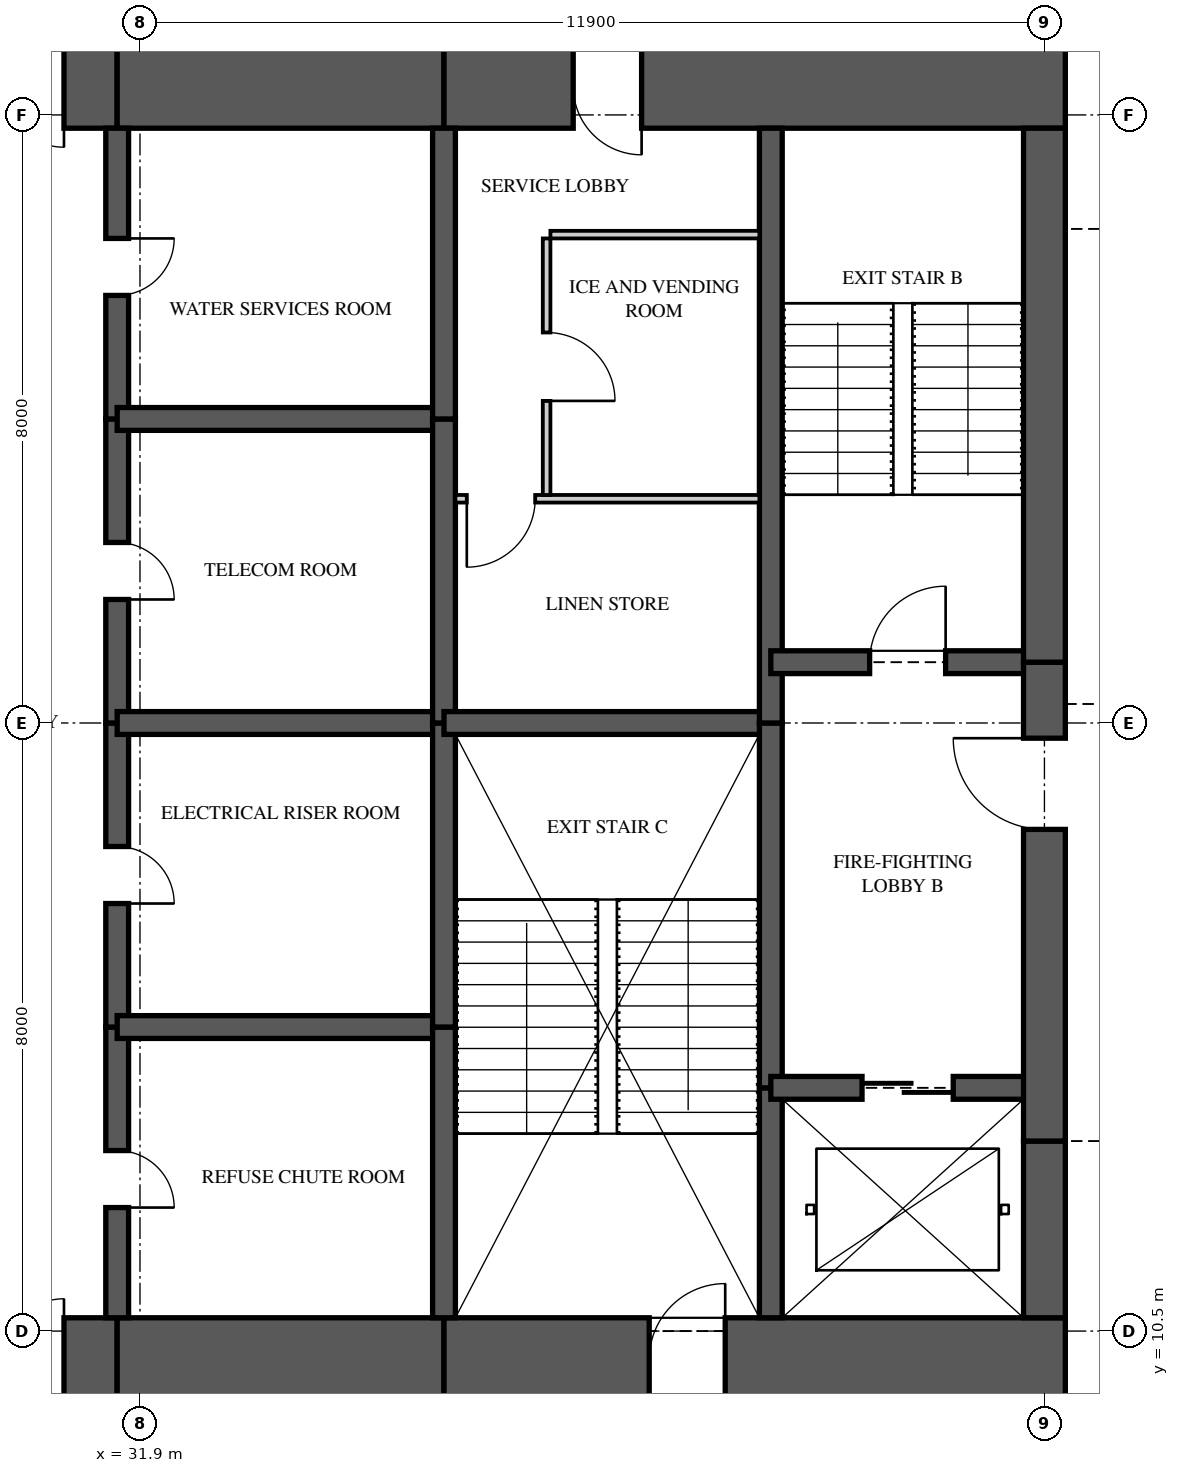
"""IFC4 building model, lengths in metres.
Left out: names, types, materials, properties, quantities, classifications, styles, units other than length and angle.
Written with IfcOpenShell. Run it as: python <this file> out.ifc"""

import sys

from ifc_helpers import new_model, si_unit, direction, frame, frame_2d, origin, place, context, subcontext, project, spatial, rectangle, extrude, element, fill, save


model = new_model("IFC4")
c1 = context("Model", 3, precision=1e-05, world=origin(), true_north=direction((0.0, 1.0)))
c2 = subcontext(c1, "Body", "Model", "MODEL_VIEW")
j1 = project(units=[si_unit("LENGTHUNIT", "METRE"), si_unit("PLANEANGLEUNIT", "RADIAN")], contexts=[c1])
p1 = place(None, origin())
s1 = spatial("IfcSite", under=j1, at=p1, CompositionType="ELEMENT")
p2 = place(p1, origin())
s2 = spatial("IfcBuilding", under=s1, at=p2, CompositionType="ELEMENT")
p3 = place(p2, frame((0.0, 0.0, 242.45)))
s3 = spatial("IfcBuildingStorey", under=s2, at=p3, CompositionType="ELEMENT", Elevation=242.45)
p4 = place(p3, frame((26.0, 10.125, 0.0), z_axis=(0.0, 0.0, 1.0), x_axis=(1.0, 0.0, 0.0)))
e1 = element("IfcWall", 1, at=p4, inside=s3, PredefinedType="SHEAR", context=c2, shape_type="SweptSolid", body=[
    extrude(rectangle(XDim=5.6, YDim=1.1, at=frame_2d((2.8, 0.0))), origin(), (0.0, 0.0, 1.0), 3.5),
])
p5 = place(p4, frame((3.3, 0.0, 0.0)))
e2 = element("IfcOpeningElement", 2, at=p5, cuts=e1, PredefinedType="OPENING", context=c2, shape_type="SweptSolid", body=[
    extrude(rectangle(XDim=1.6, YDim=2.1, at=frame_2d((0.8, 1.05))), frame((0.0, 0.56, 0.0), z_axis=(0.0, -1.0, 0.0), x_axis=(1.0, 0.0, 0.0)), (0.0, 0.0, 1.0), 1.12),
])
p6 = place(p3, frame((31.6, 10.125, 0.0), z_axis=(0.0, 0.0, 1.0), x_axis=(1.0, 0.0, 0.0)))
e3 = element("IfcWall", 3, at=p6, inside=s3, PredefinedType="SHEAR", context=c2, shape_type="SweptSolid", body=[
    extrude(rectangle(XDim=4.3, YDim=1.1, at=frame_2d((2.15, 0.0))), origin(), (0.0, 0.0, 1.0), 3.5),
])
p7 = place(p3, frame((35.9, 10.125, 0.0), z_axis=(0.0, 0.0, 1.0), x_axis=(1.0, 0.0, 0.0)))
e4 = element("IfcWall", 4, at=p7, inside=s3, PredefinedType="SHEAR", context=c2, shape_type="SweptSolid", body=[
    extrude(rectangle(XDim=8.175, YDim=1.1, at=frame_2d((4.087, 0.0))), origin(), (0.0, 0.0, 1.0), 3.5),
])
p8 = place(p7, frame((2.7, 0.0, 0.0)))
e5 = element("IfcOpeningElement", 5, at=p8, cuts=e4, PredefinedType="OPENING", context=c2, shape_type="SweptSolid", body=[
    extrude(rectangle(XDim=1.0, YDim=2.1, at=frame_2d((0.5, 1.05))), frame((0.0, 0.56, 0.0), z_axis=(0.0, -1.0, 0.0), x_axis=(1.0, 0.0, 0.0)), (0.0, 0.0, 1.0), 1.12),
])
p9 = place(p3, frame((44.075, 26.875, 0.0), z_axis=(0.0, 0.0, 1.0), x_axis=(-1.0, 0.0, 0.0)))
e6 = element("IfcWall", 6, at=p9, inside=s3, PredefinedType="SHEAR", context=c2, shape_type="SweptSolid", body=[
    extrude(rectangle(XDim=8.175, YDim=1.1, at=frame_2d((4.087, 0.0))), origin(), (0.0, 0.0, 1.0), 3.5),
])
p10 = place(p9, frame((5.575, 0.0, 0.0)))
e7 = element("IfcOpeningElement", 7, at=p10, cuts=e6, PredefinedType="OPENING", context=c2, shape_type="SweptSolid", body=[
    extrude(rectangle(XDim=0.9, YDim=2.1, at=frame_2d((0.45, 1.05))), frame((0.0, 0.56, 0.0), z_axis=(0.0, -1.0, 0.0), x_axis=(1.0, 0.0, 0.0)), (0.0, 0.0, 1.0), 1.12),
])
p11 = place(p3, frame((35.9, 26.875, 0.0), z_axis=(0.0, 0.0, 1.0), x_axis=(-1.0, 0.0, 0.0)))
e8 = element("IfcWall", 8, at=p11, inside=s3, PredefinedType="SHEAR", context=c2, shape_type="SweptSolid", body=[
    extrude(rectangle(XDim=4.3, YDim=1.1, at=frame_2d((2.15, 0.0))), origin(), (0.0, 0.0, 1.0), 3.5),
])
p12 = place(p3, frame((31.6, 26.875, 0.0), z_axis=(0.0, 0.0, 1.0), x_axis=(-1.0, 0.0, 0.0)))
e9 = element("IfcWall", 9, at=p12, inside=s3, PredefinedType="SHEAR", context=c2, shape_type="SweptSolid", body=[
    extrude(rectangle(XDim=5.6, YDim=1.1, at=frame_2d((2.8, 0.0))), origin(), (0.0, 0.0, 1.0), 3.5),
])
p13 = place(p12, frame((0.7, 0.0, 0.0)))
e10 = element("IfcOpeningElement", 10, at=p13, cuts=e9, PredefinedType="OPENING", context=c2, shape_type="SweptSolid", body=[
    extrude(rectangle(XDim=1.6, YDim=2.1, at=frame_2d((0.8, 1.05))), frame((0.0, 0.56, 0.0), z_axis=(0.0, -1.0, 0.0), x_axis=(1.0, 0.0, 0.0)), (0.0, 0.0, 1.0), 1.12),
])
p14 = place(p3, frame((43.8, 10.675, 0.0), z_axis=(0.0, 0.0, 1.0), x_axis=(0.0, 1.0, 0.0)))
e11 = element("IfcWall", 11, at=p14, inside=s3, PredefinedType="SHEAR", context=c2, shape_type="SweptSolid", body=[
    extrude(rectangle(XDim=2.325, YDim=0.55, at=frame_2d((1.163, 0.0))), origin(), (0.0, 0.0, 1.0), 3.5),
])
p15 = place(p3, frame((43.8, 13.0, 0.0), z_axis=(0.0, 0.0, 1.0), x_axis=(0.0, 1.0, 0.0)))
e12 = element("IfcWall", 12, at=p15, inside=s3, PredefinedType="SHEAR", context=c2, shape_type="SweptSolid", body=[
    extrude(rectangle(XDim=6.3, YDim=0.55, at=frame_2d((3.15, 0.0))), origin(), (0.0, 0.0, 1.0), 3.5),
])
p16 = place(p15, frame((4.1, 0.0, 0.0)))
e13 = element("IfcOpeningElement", 13, at=p16, cuts=e12, PredefinedType="OPENING", context=c2, shape_type="SweptSolid", body=[
    extrude(rectangle(XDim=1.2, YDim=2.2, at=frame_2d((0.6, 1.1))), frame((0.0, 0.285, 0.0), z_axis=(0.0, -1.0, 0.0), x_axis=(1.0, 0.0, 0.0)), (0.0, 0.0, 1.0), 0.57),
])
p17 = place(p3, frame((43.8, 19.3, 0.0), z_axis=(0.0, 0.0, 1.0), x_axis=(0.0, 1.0, 0.0)))
e14 = element("IfcWall", 14, at=p17, inside=s3, PredefinedType="SHEAR", context=c2, shape_type="SweptSolid", body=[
    extrude(rectangle(XDim=7.025, YDim=0.55, at=frame_2d((3.512, 0.0))), origin(), (0.0, 0.0, 1.0), 3.5),
])
p18 = place(p3, frame((31.6, 10.675, 0.0), z_axis=(0.0, 0.0, 1.0), x_axis=(0.0, 1.0, 0.0)))
e15 = element("IfcWall", 15, at=p18, inside=s3, PredefinedType="SHEAR", context=c2, shape_type="SweptSolid", body=[
    extrude(rectangle(XDim=3.825, YDim=0.3, at=frame_2d((1.913, 0.0))), origin(), (0.0, 0.0, 1.0), 3.5),
])
p19 = place(p18, frame((1.45, 0.0, 0.0)))
e16 = element("IfcOpeningElement", 16, at=p19, cuts=e15, PredefinedType="OPENING", context=c2, shape_type="SweptSolid", body=[
    extrude(rectangle(XDim=0.75, YDim=2.1, at=frame_2d((0.375, 1.05))), frame((0.0, 0.16, 0.0), z_axis=(0.0, -1.0, 0.0), x_axis=(1.0, 0.0, 0.0)), (0.0, 0.0, 1.0), 0.32),
])
p20 = place(p3, frame((31.6, 14.5, 0.0), z_axis=(0.0, 0.0, 1.0), x_axis=(0.0, 1.0, 0.0)))
e17 = element("IfcWall", 17, at=p20, inside=s3, PredefinedType="SHEAR", context=c2, shape_type="SweptSolid", body=[
    extrude(rectangle(XDim=4.0, YDim=0.3, at=frame_2d((2.0, 0.0))), origin(), (0.0, 0.0, 1.0), 3.5),
])
p21 = place(p20, frame((1.625, 0.0, 0.0)))
e18 = element("IfcOpeningElement", 18, at=p21, cuts=e17, PredefinedType="OPENING", context=c2, shape_type="SweptSolid", body=[
    extrude(rectangle(XDim=0.75, YDim=2.1, at=frame_2d((0.375, 1.05))), frame((0.0, 0.16, 0.0), z_axis=(0.0, -1.0, 0.0), x_axis=(1.0, 0.0, 0.0)), (0.0, 0.0, 1.0), 0.32),
])
p22 = place(p3, frame((31.6, 18.5, 0.0), z_axis=(0.0, 0.0, 1.0), x_axis=(0.0, 1.0, 0.0)))
e19 = element("IfcWall", 19, at=p22, inside=s3, PredefinedType="SHEAR", context=c2, shape_type="SweptSolid", body=[
    extrude(rectangle(XDim=4.0, YDim=0.3, at=frame_2d((2.0, 0.0))), origin(), (0.0, 0.0, 1.0), 3.5),
])
p23 = place(p22, frame((1.625, 0.0, 0.0)))
e20 = element("IfcOpeningElement", 20, at=p23, cuts=e19, PredefinedType="OPENING", context=c2, shape_type="SweptSolid", body=[
    extrude(rectangle(XDim=0.75, YDim=2.1, at=frame_2d((0.375, 1.05))), frame((0.0, 0.16, 0.0), z_axis=(0.0, -1.0, 0.0), x_axis=(1.0, 0.0, 0.0)), (0.0, 0.0, 1.0), 0.32),
])
p24 = place(p3, frame((31.6, 22.5, 0.0), z_axis=(0.0, 0.0, 1.0), x_axis=(0.0, 1.0, 0.0)))
e21 = element("IfcWall", 21, at=p24, inside=s3, PredefinedType="SHEAR", context=c2, shape_type="SweptSolid", body=[
    extrude(rectangle(XDim=3.825, YDim=0.3, at=frame_2d((1.913, 0.0))), origin(), (0.0, 0.0, 1.0), 3.5),
])
p25 = place(p24, frame((1.625, 0.0, 0.0)))
e22 = element("IfcOpeningElement", 22, at=p25, cuts=e21, PredefinedType="OPENING", context=c2, shape_type="SweptSolid", body=[
    extrude(rectangle(XDim=0.75, YDim=2.1, at=frame_2d((0.375, 1.05))), frame((0.0, 0.16, 0.0), z_axis=(0.0, -1.0, 0.0), x_axis=(1.0, 0.0, 0.0)), (0.0, 0.0, 1.0), 0.32),
])
p26 = place(p3, frame((35.9, 10.675, 0.0), z_axis=(0.0, 0.0, 1.0), x_axis=(0.0, 1.0, 0.0)))
e23 = element("IfcWall", 23, at=p26, inside=s3, PredefinedType="SHEAR", context=c2, shape_type="SweptSolid", body=[
    extrude(rectangle(XDim=3.825, YDim=0.3, at=frame_2d((1.913, 0.0))), origin(), (0.0, 0.0, 1.0), 3.5),
])
for number, where, z_axis, x_axis in (
    (24, (35.9, 14.5, 0.0), (0.0, 0.0, 1.0), (0.0, 1.0, 0.0)),
    (25, (35.9, 18.5, 0.0), (0.0, 0.0, 1.0), (0.0, 1.0, 0.0)),
):
    element("IfcWall", number, at=place(p3, frame(where, z_axis=z_axis, x_axis=x_axis)), inside=s3, PredefinedType="SHEAR", context=c2, shape_type="SweptSolid", body=[
        extrude(rectangle(XDim=4.0, YDim=0.3, at=frame_2d((2.0, 0.0))), origin(), (0.0, 0.0, 1.0), 3.5),
    ])
p27 = place(p3, frame((35.9, 22.5, 0.0), z_axis=(0.0, 0.0, 1.0), x_axis=(0.0, 1.0, 0.0)))
e26 = element("IfcWall", 26, at=p27, inside=s3, PredefinedType="SHEAR", context=c2, shape_type="SweptSolid", body=[
    extrude(rectangle(XDim=3.825, YDim=0.3, at=frame_2d((1.913, 0.0))), origin(), (0.0, 0.0, 1.0), 3.5),
])
p28 = place(p3, frame((40.2, 10.675, 0.0), z_axis=(0.0, 0.0, 1.0), x_axis=(0.0, 1.0, 0.0)))
e27 = element("IfcWall", 27, at=p28, inside=s3, PredefinedType="SHEAR", context=c2, shape_type="SweptSolid", body=[
    extrude(rectangle(XDim=3.025, YDim=0.3, at=frame_2d((1.512, 0.0))), origin(), (0.0, 0.0, 1.0), 3.5),
])
p29 = place(p3, frame((40.2, 13.7, 0.0), z_axis=(0.0, 0.0, 1.0), x_axis=(0.0, 1.0, 0.0)))
e28 = element("IfcWall", 28, at=p29, inside=s3, PredefinedType="SHEAR", context=c2, shape_type="SweptSolid", body=[
    extrude(rectangle(XDim=4.8, YDim=0.3, at=frame_2d((2.4, 0.0))), origin(), (0.0, 0.0, 1.0), 3.5),
])
p30 = place(p3, frame((40.2, 18.5, 0.0), z_axis=(0.0, 0.0, 1.0), x_axis=(0.0, 1.0, 0.0)))
e29 = element("IfcWall", 29, at=p30, inside=s3, PredefinedType="SHEAR", context=c2, shape_type="SweptSolid", body=[
    extrude(rectangle(XDim=7.825, YDim=0.3, at=frame_2d((3.913, 0.0))), origin(), (0.0, 0.0, 1.0), 3.5),
])
for number, where, z_axis, x_axis in (
    (30, (31.6, 14.5, 0.0), (0.0, 0.0, 1.0), (1.0, 0.0, 0.0)),
    (31, (31.6, 18.5, 0.0), (0.0, 0.0, 1.0), (1.0, 0.0, 0.0)),
    (32, (31.6, 22.5, 0.0), (0.0, 0.0, 1.0), (1.0, 0.0, 0.0)),
):
    element("IfcWall", number, at=place(p3, frame(where, z_axis=z_axis, x_axis=x_axis)), inside=s3, PredefinedType="SHEAR", context=c2, shape_type="SweptSolid", body=[
        extrude(rectangle(XDim=4.3, YDim=0.3, at=frame_2d((2.15, 0.0))), origin(), (0.0, 0.0, 1.0), 3.5),
    ])
p31 = place(p3, frame((35.9, 18.5, 0.0), z_axis=(0.0, 0.0, 1.0), x_axis=(1.0, 0.0, 0.0)))
e33 = element("IfcWall", 33, at=p31, inside=s3, PredefinedType="SHEAR", context=c2, shape_type="SweptSolid", body=[
    extrude(rectangle(XDim=4.3, YDim=0.3, at=frame_2d((2.15, 0.0))), origin(), (0.0, 0.0, 1.0), 3.5),
])
p32 = place(p3, frame((40.2, 13.7, 0.0), z_axis=(0.0, 0.0, 1.0), x_axis=(1.0, 0.0, 0.0)))
e34 = element("IfcWall", 34, at=p32, inside=s3, PredefinedType="SHEAR", context=c2, shape_type="SweptSolid", body=[
    extrude(rectangle(XDim=3.6, YDim=0.3, at=frame_2d((1.8, 0.0))), origin(), (0.0, 0.0, 1.0), 3.5),
])
p33 = place(p32, frame((1.2, 0.0, 0.0)))
e35 = element("IfcOpeningElement", 35, at=p33, cuts=e34, PredefinedType="OPENING", context=c2, shape_type="SweptSolid", body=[
    extrude(rectangle(XDim=1.2, YDim=2.1, at=frame_2d((0.6, 1.05))), frame((0.0, 0.16, 0.0), z_axis=(0.0, -1.0, 0.0), x_axis=(1.0, 0.0, 0.0)), (0.0, 0.0, 1.0), 0.32),
])
p34 = place(p3, frame((40.2, 19.3, 0.0), z_axis=(0.0, 0.0, 1.0), x_axis=(1.0, 0.0, 0.0)))
e36 = element("IfcWall", 36, at=p34, inside=s3, PredefinedType="SHEAR", context=c2, shape_type="SweptSolid", body=[
    extrude(rectangle(XDim=3.6, YDim=0.3, at=frame_2d((1.8, 0.0))), origin(), (0.0, 0.0, 1.0), 3.5),
])
p35 = place(p34, frame((1.3, 0.0, 0.0)))
e37 = element("IfcOpeningElement", 37, at=p35, cuts=e36, PredefinedType="OPENING", context=c2, shape_type="SweptSolid", body=[
    extrude(rectangle(XDim=1.0, YDim=2.1, at=frame_2d((0.5, 1.05))), frame((0.0, 0.16, 0.0), z_axis=(0.0, -1.0, 0.0), x_axis=(1.0, 0.0, 0.0)), (0.0, 0.0, 1.0), 0.32),
])
p36 = place(p3, frame((37.3, 24.925, 0.0), z_axis=(0.0, 0.0, 1.0), x_axis=(1.0, 0.0, 0.0)))
e38 = element("IfcWall", 38, at=p36, inside=s3, PredefinedType="PARTITIONING", context=c2, shape_type="SweptSolid", body=[
    extrude(rectangle(XDim=2.75, YDim=0.1, at=frame_2d((1.375, 0.0))), origin(), (0.0, 0.0, 1.0), 3.26),
])
p37 = place(p3, frame((37.25, 21.5, 0.0), z_axis=(0.0, 0.0, 1.0), x_axis=(0.0, 1.0, 0.0)))
e39 = element("IfcWall", 39, at=p37, inside=s3, PredefinedType="PARTITIONING", context=c2, shape_type="SweptSolid", body=[
    extrude(rectangle(XDim=3.375, YDim=0.1, at=frame_2d((1.688, 0.0))), origin(), (0.0, 0.0, 1.0), 3.26),
])
p38 = place(p37, frame((1.238, 0.0, 0.0)))
e40 = element("IfcOpeningElement", 40, at=p38, cuts=e39, PredefinedType="OPENING", context=c2, shape_type="SweptSolid", body=[
    extrude(rectangle(XDim=0.9, YDim=2.1, at=frame_2d((0.45, 1.05))), frame((0.0, 0.06, 0.0), z_axis=(0.0, -1.0, 0.0), x_axis=(1.0, 0.0, 0.0)), (0.0, 0.0, 1.0), 0.12),
])
p39 = place(p3, frame((36.05, 21.45, 0.0), z_axis=(0.0, 0.0, 1.0), x_axis=(1.0, 0.0, 0.0)))
e41 = element("IfcWall", 41, at=p39, inside=s3, PredefinedType="PARTITIONING", context=c2, shape_type="SweptSolid", body=[
    extrude(rectangle(XDim=4.0, YDim=0.1, at=frame_2d((2.0, 0.0))), origin(), (0.0, 0.0, 1.0), 3.26),
])
p40 = place(p39, frame((0.15, 0.0, 0.0)))
e42 = element("IfcOpeningElement", 42, at=p40, cuts=e41, PredefinedType="OPENING", context=c2, shape_type="SweptSolid", body=[
    extrude(rectangle(XDim=0.9, YDim=2.1, at=frame_2d((0.45, 1.05))), frame((0.0, 0.06, 0.0), z_axis=(0.0, -1.0, 0.0), x_axis=(1.0, 0.0, 0.0)), (0.0, 0.0, 1.0), 0.12),
])
p41 = place(p38, frame((0.9, 0.0, 0.0), z_axis=(0.0, 0.0, 1.0), x_axis=(-1.0, 0.0, 0.0)))
e43 = element("IfcDoor", 43, at=p41, inside=s3, OperationType="SINGLE_SWING_RIGHT", PredefinedType="DOOR", context=c2, shape_type="SweptSolid", body=[
    extrude(rectangle(XDim=0.9, YDim=2.1, at=frame_2d((0.45, 1.05))), frame((0.0, 0.025, 0.0), z_axis=(0.0, -1.0, 0.0), x_axis=(1.0, 0.0, 0.0)), (0.0, 0.0, 1.0), 0.05),
])
fill(e40, e43)
p42 = place(p40, frame((0.9, 0.0, 0.0), z_axis=(0.0, 0.0, 1.0), x_axis=(-1.0, 0.0, 0.0)))
e44 = element("IfcDoor", 44, at=p42, inside=s3, OperationType="SINGLE_SWING_RIGHT", PredefinedType="DOOR", context=c2, shape_type="SweptSolid", body=[
    extrude(rectangle(XDim=0.9, YDim=2.1, at=frame_2d((0.45, 1.05))), frame((0.0, 0.025, 0.0), z_axis=(0.0, -1.0, 0.0), x_axis=(1.0, 0.0, 0.0)), (0.0, 0.0, 1.0), 0.05),
])
fill(e42, e44)
p43 = place(p35, origin())
e45 = element("IfcDoor", 45, at=p43, inside=s3, OperationType="SINGLE_SWING_RIGHT", PredefinedType="DOOR", context=c2, shape_type="SweptSolid", body=[
    extrude(rectangle(XDim=1.0, YDim=2.1, at=frame_2d((0.5, 1.05))), frame((0.0, 0.025, 0.0), z_axis=(0.0, -1.0, 0.0), x_axis=(1.0, 0.0, 0.0)), (0.0, 0.0, 1.0), 0.05),
])
fill(e37, e45)
p44 = place(p16, origin())
e46 = element("IfcDoor", 46, at=p44, inside=s3, OperationType="SINGLE_SWING_RIGHT", PredefinedType="DOOR", context=c2, shape_type="SweptSolid", body=[
    extrude(rectangle(XDim=1.2, YDim=2.2, at=frame_2d((0.6, 1.1))), frame((0.0, 0.025, 0.0), z_axis=(0.0, -1.0, 0.0), x_axis=(1.0, 0.0, 0.0)), (0.0, 0.0, 1.0), 0.05),
])
fill(e13, e46)
p45 = place(p33, origin())
e47 = element("IfcDoor", 47, at=p45, inside=s3, OperationType="SLIDING_TO_LEFT", PredefinedType="DOOR", context=c2, shape_type="SweptSolid", body=[
    extrude(rectangle(XDim=1.2, YDim=2.1, at=frame_2d((0.6, 1.05))), frame((0.0, 0.025, 0.0), z_axis=(0.0, -1.0, 0.0), x_axis=(1.0, 0.0, 0.0)), (0.0, 0.0, 1.0), 0.05),
])
fill(e35, e47)
p46 = place(p5, origin())
e48 = element("IfcDoor", 48, at=p46, inside=s3, OperationType="DOUBLE_DOOR_SINGLE_SWING", PredefinedType="DOOR", context=c2, shape_type="SweptSolid", body=[
    extrude(rectangle(XDim=1.6, YDim=2.1, at=frame_2d((0.8, 1.05))), frame((0.0, 0.025, 0.0), z_axis=(0.0, -1.0, 0.0), x_axis=(1.0, 0.0, 0.0)), (0.0, 0.0, 1.0), 0.05),
])
fill(e2, e48)
p47 = place(p13, origin())
e49 = element("IfcDoor", 49, at=p47, inside=s3, OperationType="DOUBLE_DOOR_SINGLE_SWING", PredefinedType="DOOR", context=c2, shape_type="SweptSolid", body=[
    extrude(rectangle(XDim=1.6, YDim=2.1, at=frame_2d((0.8, 1.05))), frame((0.0, 0.025, 0.0), z_axis=(0.0, -1.0, 0.0), x_axis=(1.0, 0.0, 0.0)), (0.0, 0.0, 1.0), 0.05),
])
fill(e10, e49)
p48 = place(p19, frame((0.75, 0.0, 0.0), z_axis=(0.0, 0.0, 1.0), x_axis=(-1.0, 0.0, 0.0)))
e50 = element("IfcDoor", 50, at=p48, inside=s3, OperationType="SINGLE_SWING_RIGHT", PredefinedType="DOOR", context=c2, shape_type="SweptSolid", body=[
    extrude(rectangle(XDim=0.75, YDim=2.1, at=frame_2d((0.375, 1.05))), frame((0.0, 0.025, 0.0), z_axis=(0.0, -1.0, 0.0), x_axis=(1.0, 0.0, 0.0)), (0.0, 0.0, 1.0), 0.05),
])
fill(e16, e50)
p49 = place(p21, frame((0.75, 0.0, 0.0), z_axis=(0.0, 0.0, 1.0), x_axis=(-1.0, 0.0, 0.0)))
e51 = element("IfcDoor", 51, at=p49, inside=s3, OperationType="SINGLE_SWING_RIGHT", PredefinedType="DOOR", context=c2, shape_type="SweptSolid", body=[
    extrude(rectangle(XDim=0.75, YDim=2.1, at=frame_2d((0.375, 1.05))), frame((0.0, 0.025, 0.0), z_axis=(0.0, -1.0, 0.0), x_axis=(1.0, 0.0, 0.0)), (0.0, 0.0, 1.0), 0.05),
])
fill(e18, e51)
p50 = place(p23, frame((0.75, 0.0, 0.0), z_axis=(0.0, 0.0, 1.0), x_axis=(-1.0, 0.0, 0.0)))
e52 = element("IfcDoor", 52, at=p50, inside=s3, OperationType="SINGLE_SWING_RIGHT", PredefinedType="DOOR", context=c2, shape_type="SweptSolid", body=[
    extrude(rectangle(XDim=0.75, YDim=2.1, at=frame_2d((0.375, 1.05))), frame((0.0, 0.025, 0.0), z_axis=(0.0, -1.0, 0.0), x_axis=(1.0, 0.0, 0.0)), (0.0, 0.0, 1.0), 0.05),
])
fill(e20, e52)
p51 = place(p25, frame((0.75, 0.0, 0.0), z_axis=(0.0, 0.0, 1.0), x_axis=(-1.0, 0.0, 0.0)))
e53 = element("IfcDoor", 53, at=p51, inside=s3, OperationType="SINGLE_SWING_LEFT", PredefinedType="DOOR", context=c2, shape_type="SweptSolid", body=[
    extrude(rectangle(XDim=0.75, YDim=2.1, at=frame_2d((0.375, 1.05))), frame((0.0, 0.025, 0.0), z_axis=(0.0, -1.0, 0.0), x_axis=(1.0, 0.0, 0.0)), (0.0, 0.0, 1.0), 0.05),
])
fill(e22, e53)
p52 = place(p8, origin())
e54 = element("IfcDoor", 54, at=p52, inside=s3, OperationType="SINGLE_SWING_RIGHT", PredefinedType="DOOR", context=c2, shape_type="SweptSolid", body=[
    extrude(rectangle(XDim=1.0, YDim=2.1, at=frame_2d((0.5, 1.05))), frame((0.0, 0.025, 0.0), z_axis=(0.0, -1.0, 0.0), x_axis=(1.0, 0.0, 0.0)), (0.0, 0.0, 1.0), 0.05),
])
fill(e5, e54)
p53 = place(p10, origin())
e55 = element("IfcDoor", 55, at=p53, inside=s3, OperationType="SINGLE_SWING_LEFT", PredefinedType="DOOR", context=c2, shape_type="SweptSolid", body=[
    extrude(rectangle(XDim=0.9, YDim=2.1, at=frame_2d((0.45, 1.05))), frame((0.0, 0.47, 0.0), z_axis=(0.0, -1.0, 0.0), x_axis=(1.0, 0.0, 0.0)), (0.0, 0.0, 1.0), 0.8),
])
fill(e7, e55)
save(model, sys.argv[1])
